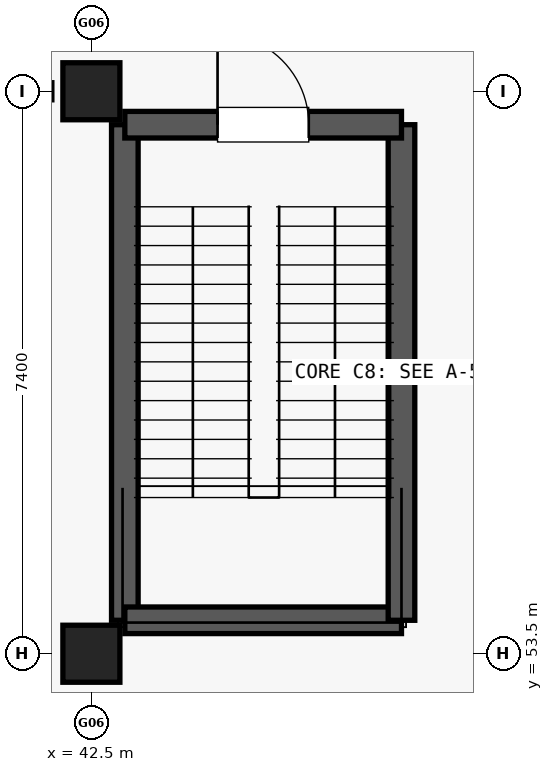
"""IFC4 building model, lengths in metres.
Left out: names, types, materials, properties, quantities, classifications, styles, units other than length and angle.
Written with IfcOpenShell. Run it as: python <this file> out.ifc"""

import sys

from ifc_helpers import new_model, si_unit, direction, frame, frame_2d, origin, origin_2d, place, context, subcontext, project, spatial, rectangle, extrude, element, fill, save


model = new_model("IFC4")
c1 = context("Model", 3, precision=1e-05, world=origin(), true_north=direction((0.0, 1.0)))
c2 = subcontext(c1, "Body", "Model", "MODEL_VIEW")
j1 = project(units=[si_unit("LENGTHUNIT", "METRE"), si_unit("PLANEANGLEUNIT", "RADIAN")], contexts=[c1])
p1 = place(None, origin())
s1 = spatial("IfcSite", under=j1, at=p1, CompositionType="ELEMENT")
p2 = place(p1, origin())
s2 = spatial("IfcBuilding", under=s1, at=p2, CompositionType="ELEMENT")
p3 = place(p2, origin())
s3 = spatial("IfcBuildingStorey", under=s2, at=p3, CompositionType="ELEMENT", Elevation=0.0)
for number, where, z_axis, x_axis in (
    (1, (42.5, 53.5, 0.0), (0.0, 0.0, 1.0), (1.0, 0.0, 0.0)),
    (2, (42.5, 60.9, 0.0), (0.0, 0.0, 1.0), (1.0, 0.0, 0.0)),
):
    element("IfcColumn", number, at=place(p3, frame(where, z_axis=z_axis, x_axis=x_axis)), inside=s3, PredefinedType="COLUMN", context=c2, shape_type="SweptSolid", body=[
        extrude(rectangle(XDim=0.75, YDim=0.75, at=origin_2d()), origin(), (0.0, 0.0, 1.0), 5.135),
    ])
p4 = place(p3, frame((42.94, 53.94, 0.0), z_axis=(0.0, 0.0, 1.0), x_axis=(0.0, 1.0, 0.0)))
e3 = element("IfcWall", 3, at=p4, inside=s3, PredefinedType="SHEAR", context=c2, shape_type="SweptSolid", body=[
    extrude(rectangle(XDim=6.52, YDim=0.35, at=frame_2d((3.26, 0.0))), origin(), (0.0, 0.0, 1.0), 5.13),
])
p5 = place(p3, frame((42.94, 53.94, 0.0), z_axis=(0.0, 0.0, 1.0), x_axis=(1.0, 0.0, 0.0)))
e4 = element("IfcWall", 4, at=p5, inside=s3, PredefinedType="SHEAR", context=c2, shape_type="SweptSolid", body=[
    extrude(rectangle(XDim=3.64, YDim=0.35, at=frame_2d((1.82, 0.0))), origin(), (0.0, 0.0, 1.0), 5.13),
])
p6 = place(p3, frame((46.58, 53.94, 0.0), z_axis=(0.0, 0.0, 1.0), x_axis=(0.0, 1.0, 0.0)))
e5 = element("IfcWall", 5, at=p6, inside=s3, PredefinedType="SHEAR", context=c2, shape_type="SweptSolid", body=[
    extrude(rectangle(XDim=6.52, YDim=0.35, at=frame_2d((3.26, 0.0))), origin(), (0.0, 0.0, 1.0), 5.13),
])
p7 = place(p3, frame((42.94, 60.46, 0.0), z_axis=(0.0, 0.0, 1.0), x_axis=(1.0, 0.0, 0.0)))
e6 = element("IfcWall", 6, at=p7, inside=s3, PredefinedType="SHEAR", context=c2, shape_type="SweptSolid", body=[
    extrude(rectangle(XDim=3.64, YDim=0.35, at=frame_2d((1.82, 0.0))), origin(), (0.0, 0.0, 1.0), 5.13),
])
p8 = place(p7, frame((1.22, 0.0, 0.0)))
e7 = element("IfcOpeningElement", 7, at=p8, cuts=e6, PredefinedType="OPENING", context=c2, shape_type="SweptSolid", body=[
    extrude(rectangle(XDim=1.2, YDim=2.15, at=frame_2d((0.6, 1.075))), frame((0.0, 0.185, 0.0), z_axis=(0.0, -1.0, 0.0), x_axis=(1.0, 0.0, 0.0)), (0.0, 0.0, 1.0), 0.37),
])
p9 = place(p8, origin())
e8 = element("IfcDoor", 8, at=p9, inside=s3, OperationType="SINGLE_SWING_LEFT", PredefinedType="DOOR", context=c2, shape_type="SweptSolid", body=[
    extrude(rectangle(XDim=1.2, YDim=2.15, at=frame_2d((0.6, 1.075))), frame((0.0, 0.025, 0.0), z_axis=(0.0, -1.0, 0.0), x_axis=(1.0, 0.0, 0.0)), (0.0, 0.0, 1.0), 0.05),
])
fill(e7, e8)
save(model, sys.argv[1])
